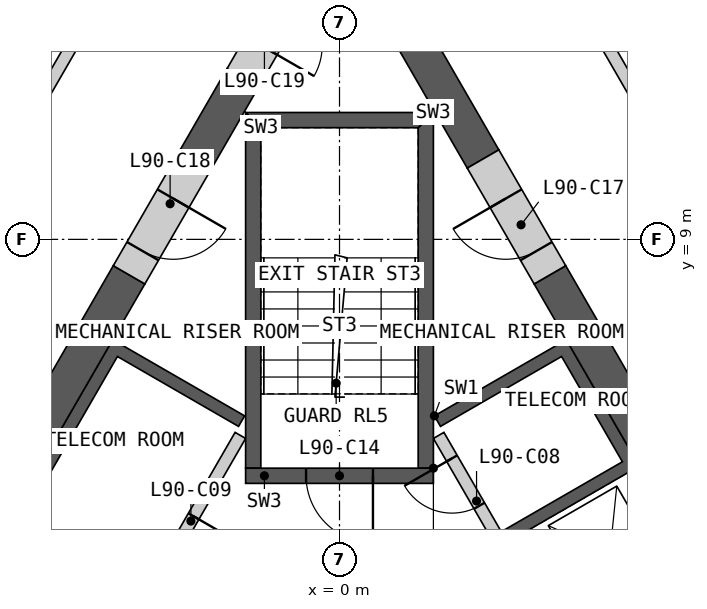
"""IFC4 building model, lengths in metres.
Left out: names, types, materials, properties, quantities, classifications, styles, units other than length and angle.
Written with IfcOpenShell. Run it as: python <this file> out.ifc"""

import sys

from ifc_helpers import new_model, si_unit, direction, frame, frame_2d, origin, place, context, subcontext, project, spatial, polyline, rectangle, outline, extrude, element, fill, save


model = new_model("IFC4")
c1 = context("Model", 3, precision=1e-05, world=origin(), true_north=direction((0.0, 1.0)))
c2 = subcontext(c1, "Body", "Model", "MODEL_VIEW")
j1 = project(units=[si_unit("LENGTHUNIT", "METRE"), si_unit("PLANEANGLEUNIT", "RADIAN")], contexts=[c1])
p1 = place(None, origin())
s1 = spatial("IfcSite", under=j1, at=p1, CompositionType="ELEMENT")
p2 = place(p1, origin())
s2 = spatial("IfcBuilding", under=s1, at=p2, CompositionType="ELEMENT")
p3 = place(p2, frame((0.0, 0.0, 395.0)))
s3 = spatial("IfcBuildingStorey", under=s2, at=p3, CompositionType="ELEMENT", Elevation=395.0)
p4 = place(p3, origin())
e1 = element("IfcWall", 1, at=p4, inside=s3, PredefinedType="SHEAR", context=c2, shape_type="SweptSolid", body=[
    extrude(outline(polyline([(1.561, 6.097), (3.731, 7.35), (8.231, -0.444), (6.061, -1.697), (5.96, -1.524), (7.952, -0.374), (6.952, 1.358), (4.96, 0.208), (4.861, 0.381), (6.852, 1.531), (5.852, 3.263), (3.861, 2.113), (3.76, 2.287), (5.752, 3.437), (4.752, 5.169), (2.76, 4.019), (2.66, 4.192), (4.652, 5.342), (3.652, 7.074), (1.66, 5.924), (1.561, 6.097)])), origin(), (0.0, 0.0, 1.0), 3.1),
])
p5 = place(p3, frame((5.817, -1.476, 0.0), z_axis=(0.0, 0.0, 1.0), x_axis=(-0.500002616675, 0.866023893041, 0.0)))
e2 = element("IfcWall", 2, at=p5, inside=s3, PredefinedType="SOLIDWALL", context=c2, shape_type="SweptSolid", body=[
    extrude(rectangle(XDim=8.373, YDim=0.2, at=frame_2d((4.187, 0.0))), origin(), (0.0, 0.0, 1.0), 3.1),
])
p6 = place(p5, frame((0.337, 0.0, 0.0)))
e3 = element("IfcOpeningElement", 3, at=p6, cuts=e2, PredefinedType="OPENING", context=c2, shape_type="SweptSolid", body=[
    extrude(rectangle(XDim=1.1, YDim=2.1, at=frame_2d((0.55, 1.05))), frame((0.0, 0.11, 0.0), z_axis=(0.0, -1.0, 0.0), x_axis=(1.0, 0.0, 0.0)), (0.0, 0.0, 1.0), 0.22),
])
p7 = place(p5, frame((2.537, 0.0, 0.0)))
e4 = element("IfcOpeningElement", 4, at=p7, cuts=e2, PredefinedType="OPENING", context=c2, shape_type="SweptSolid", body=[
    extrude(rectangle(XDim=1.1, YDim=2.1, at=frame_2d((0.55, 1.05))), frame((0.0, 0.11, 0.0), z_axis=(0.0, -1.0, 0.0), x_axis=(1.0, 0.0, 0.0)), (0.0, 0.0, 1.0), 0.22),
])
p8 = place(p5, frame((4.737, 0.0, 0.0)))
e5 = element("IfcOpeningElement", 5, at=p8, cuts=e2, PredefinedType="OPENING", context=c2, shape_type="SweptSolid", body=[
    extrude(rectangle(XDim=1.1, YDim=2.1, at=frame_2d((0.55, 1.05))), frame((0.0, 0.11, 0.0), z_axis=(0.0, -1.0, 0.0), x_axis=(1.0, 0.0, 0.0)), (0.0, 0.0, 1.0), 0.22),
])
p9 = place(p5, frame((7.037, 0.0, 0.0)))
e6 = element("IfcOpeningElement", 6, at=p9, cuts=e2, PredefinedType="OPENING", context=c2, shape_type="SweptSolid", body=[
    extrude(rectangle(XDim=0.9, YDim=2.1, at=frame_2d((0.45, 1.05))), frame((0.0, 0.11, 0.0), z_axis=(0.0, -1.0, 0.0), x_axis=(1.0, 0.0, 0.0)), (0.0, 0.0, 1.0), 0.22),
])
p10 = place(p3, origin())
e7 = element("IfcWall", 7, at=p10, inside=s3, PredefinedType="SHEAR", context=c2, shape_type="SweptSolid", body=[
    extrude(outline(polyline([(-4.96, 0.208), (-7.131, 1.461), (-3.731, 7.35), (-1.561, 6.097), (-1.66, 5.924), (-3.652, 7.074), (-5.752, 3.437), (-3.76, 2.287), (-3.861, 2.113), (-5.852, 3.263), (-6.852, 1.531), (-4.861, 0.381), (-4.96, 0.208)])), origin(), (0.0, 0.0, 1.0), 3.1),
])
p11 = place(p3, frame((-1.631, 5.776, 0.0), z_axis=(0.0, 0.0, 1.0), x_axis=(-0.499992876559, -0.866029516466, 0.0)))
e8 = element("IfcWall", 8, at=p11, inside=s3, PredefinedType="SOLIDWALL", context=c2, shape_type="SweptSolid", body=[
    extrude(rectangle(XDim=6.486, YDim=0.2, at=frame_2d((3.243, 0.0))), origin(), (0.0, 0.0, 1.0), 3.1),
])
p12 = place(p11, frame((1.537, 0.0, 0.0)))
e9 = element("IfcOpeningElement", 9, at=p12, cuts=e8, PredefinedType="OPENING", context=c2, shape_type="SweptSolid", body=[
    extrude(rectangle(XDim=0.9, YDim=2.1, at=frame_2d((0.45, 1.05))), frame((0.0, 0.11, 0.0), z_axis=(0.0, -1.0, 0.0), x_axis=(1.0, 0.0, 0.0)), (0.0, 0.0, 1.0), 0.22),
])
p13 = place(p11, frame((4.837, 0.0, 0.0)))
e10 = element("IfcOpeningElement", 10, at=p13, cuts=e8, PredefinedType="OPENING", context=c2, shape_type="SweptSolid", body=[
    extrude(rectangle(XDim=0.9, YDim=2.1, at=frame_2d((0.45, 1.05))), frame((0.0, 0.11, 0.0), z_axis=(0.0, -1.0, 0.0), x_axis=(1.0, 0.0, 0.0)), (0.0, 0.0, 1.0), 0.22),
])
p14 = place(p3, origin())
e11 = element("IfcWall", 11, at=p14, inside=s3, PredefinedType="SHEAR", context=c2, shape_type="SweptSolid", body=[
    extrude(outline(polyline([(1.544, 5.237), (1.544, 11.087), (1.294, 10.837), (1.294, 5.237), (1.544, 5.237)])), origin(), (0.0, 0.0, 1.0), 3.1),
])
p15 = place(p3, origin())
e12 = element("IfcWall", 12, at=p15, inside=s3, PredefinedType="SHEAR", context=c2, shape_type="SweptSolid", body=[
    extrude(outline(polyline([(1.544, 11.087), (-1.544, 11.087), (-1.294, 10.837), (1.294, 10.837), (1.544, 11.087)])), origin(), (0.0, 0.0, 1.0), 3.1),
])
p16 = place(p3, origin())
e13 = element("IfcWall", 13, at=p16, inside=s3, PredefinedType="SHEAR", context=c2, shape_type="SweptSolid", body=[
    extrude(outline(polyline([(-1.294, 10.837), (-1.544, 11.087), (-1.544, 5.237), (-1.294, 5.237), (-1.294, 10.837)])), origin(), (0.0, 0.0, 1.0), 3.1),
])
p17 = place(p3, frame((1.544, 5.112, 0.0), z_axis=(0.0, 0.0, 1.0), x_axis=(-1.0, 0.0, 0.0)))
e14 = element("IfcWall", 14, at=p17, inside=s3, PredefinedType="SHEAR", context=c2, shape_type="SweptSolid", body=[
    extrude(rectangle(XDim=3.088, YDim=0.25, at=frame_2d((1.544, 0.0))), origin(), (0.0, 0.0, 1.0), 3.1),
])
p18 = place(p17, frame((0.994, 0.0, 0.0)))
e15 = element("IfcOpeningElement", 15, at=p18, cuts=e14, PredefinedType="OPENING", context=c2, shape_type="SweptSolid", body=[
    extrude(rectangle(XDim=1.1, YDim=2.1, at=frame_2d((0.55, 1.05))), frame((0.0, 0.135, 0.0), z_axis=(0.0, -1.0, 0.0), x_axis=(1.0, 0.0, 0.0)), (0.0, 0.0, 1.0), 0.27),
])
p19 = place(p3, frame((8.686, -0.634, 0.0), z_axis=(0.0, 0.0, 1.0), x_axis=(-0.50001836461, 0.866014800712, 0.0)))
e16 = element("IfcWall", 16, at=p19, inside=s3, PredefinedType="SHEAR", context=c2, shape_type="SweptSolid", body=[
    extrude(rectangle(XDim=10.451, YDim=0.6, at=frame_2d((5.225, 0.0))), origin(), (0.0, 0.0, 1.0), 3.1),
])
p20 = place(p3, frame((2.361, 10.322, 0.0), z_axis=(0.0, 0.0, 1.0), x_axis=(-0.500000735859, 0.866024978935, 0.0)))
e17 = element("IfcWall", 17, at=p20, inside=s3, PredefinedType="SHEAR", context=c2, shape_type="SweptSolid", body=[
    extrude(rectangle(XDim=4.202, YDim=0.6, at=frame_2d((2.101, 0.0))), origin(), (0.0, 0.0, 1.0), 3.1),
])
p21 = place(p3, frame((-3.461, 8.417, 0.0), z_axis=(0.0, 0.0, 1.0), x_axis=(-0.50000391502, -0.866023143435, 0.0)))
e18 = element("IfcWall", 18, at=p21, inside=s3, PredefinedType="SHEAR", context=c2, shape_type="SweptSolid", body=[
    extrude(rectangle(XDim=7.759, YDim=0.6, at=frame_2d((3.879, 0.0))), origin(), (0.0, 0.0, 1.0), 3.1),
])
p22 = place(p3, frame((-1.59, 11.658, 0.0), z_axis=(0.0, 0.0, 1.0), x_axis=(-0.500037594623, -0.866003697431, 0.0)))
e19 = element("IfcWall", 19, at=p22, inside=s3, PredefinedType="SHEAR", context=c2, shape_type="SweptSolid", body=[
    extrude(rectangle(XDim=1.542, YDim=0.6, at=frame_2d((0.771, 0.0))), origin(), (0.0, 0.0, 1.0), 3.1),
])
p23 = place(p3, frame((3.461, 8.417, 0.0), z_axis=(0.0, 0.0, 1.0), x_axis=(-0.499946605688, 0.86605622881, 0.0)))
e20 = element("IfcWall", 20, at=p23, inside=s3, PredefinedType="SHEAR", context=c2, shape_type="SweptSolid", body=[
    extrude(rectangle(XDim=2.2, YDim=0.6, at=frame_2d((1.1, 0.0))), origin(), (0.0, 0.0, 1.0), 3.1),
])
p24 = place(p23, frame((0.45, 0.0, 0.0)))
e21 = element("IfcOpeningElement", 21, at=p24, cuts=e20, PredefinedType="OPENING", context=c2, shape_type="SweptSolid", body=[
    extrude(rectangle(XDim=1.0, YDim=2.1, at=frame_2d((0.5, 1.05))), frame((0.0, 0.31, 0.0), z_axis=(0.0, -1.0, 0.0), x_axis=(1.0, 0.0, 0.0)), (0.0, 0.0, 1.0), 0.62),
])
p25 = place(p3, frame((-2.361, 10.322, 0.0), z_axis=(0.0, 0.0, 1.0), x_axis=(-0.499946605688, -0.86605622881, 0.0)))
e22 = element("IfcWall", 22, at=p25, inside=s3, PredefinedType="SHEAR", context=c2, shape_type="SweptSolid", body=[
    extrude(rectangle(XDim=2.2, YDim=0.6, at=frame_2d((1.1, 0.0))), origin(), (0.0, 0.0, 1.0), 3.1),
])
p26 = place(p25, frame((0.75, 0.0, 0.0)))
e23 = element("IfcOpeningElement", 23, at=p26, cuts=e22, PredefinedType="OPENING", context=c2, shape_type="SweptSolid", body=[
    extrude(rectangle(XDim=1.0, YDim=2.1, at=frame_2d((0.5, 1.05))), frame((0.0, 0.31, 0.0), z_axis=(0.0, -1.0, 0.0), x_axis=(1.0, 0.0, 0.0)), (0.0, 0.0, 1.0), 0.62),
])
p27 = place(p3, frame((-0.26, 13.961, 0.0), z_axis=(0.0, 0.0, 1.0), x_axis=(-0.49997936161, -0.866037319036, 0.0)))
e24 = element("IfcWall", 24, at=p27, inside=s3, PredefinedType="SHEAR", context=c2, shape_type="SweptSolid", body=[
    extrude(rectangle(XDim=2.66, YDim=0.6, at=frame_2d((1.33, 0.0))), origin(), (0.0, 0.0, 1.0), 3.1),
])
p28 = place(p27, frame((1.05, 0.0, 0.0)))
e25 = element("IfcOpeningElement", 25, at=p28, cuts=e24, PredefinedType="OPENING", context=c2, shape_type="SweptSolid", body=[
    extrude(rectangle(XDim=1.0, YDim=2.1, at=frame_2d((0.5, 1.05))), frame((0.0, 0.31, 0.0), z_axis=(0.0, -1.0, 0.0), x_axis=(1.0, 0.0, 0.0)), (0.0, 0.0, 1.0), 0.62),
])
p29 = place(p3, frame((4.403, 12.185, 0.0), z_axis=(0.0, 0.0, 1.0), x_axis=(0.499992155518, -0.866029932751, 0.0)))
e26 = element("IfcWall", 26, at=p29, inside=s3, PredefinedType="PARTITIONING", context=c2, shape_type="SweptSolid", body=[
    extrude(rectangle(XDim=8.123, YDim=0.2, at=frame_2d((4.062, 0.0))), origin(), (0.0, 0.0, 1.0), 3.1),
])
p30 = place(p29, frame((3.762, 0.0, 0.0)))
e27 = element("IfcOpeningElement", 27, at=p30, cuts=e26, PredefinedType="OPENING", context=c2, shape_type="SweptSolid", body=[
    extrude(rectangle(XDim=1.0, YDim=2.1, at=frame_2d((0.5, 1.05))), frame((0.0, 0.11, 0.0), z_axis=(0.0, -1.0, 0.0), x_axis=(1.0, 0.0, 0.0)), (0.0, 0.0, 1.0), 0.22),
])
p31 = place(p3, frame((-8.465, 5.15, 0.0), z_axis=(0.0, 0.0, 1.0), x_axis=(0.499992155518, 0.866029932751, 0.0)))
e28 = element("IfcWall", 28, at=p31, inside=s3, PredefinedType="PARTITIONING", context=c2, shape_type="SweptSolid", body=[
    extrude(rectangle(XDim=8.123, YDim=0.2, at=frame_2d((4.062, 0.0))), origin(), (0.0, 0.0, 1.0), 3.1),
])
p32 = place(p31, frame((1.956, 0.0, 0.0)))
e29 = element("IfcOpeningElement", 29, at=p32, cuts=e28, PredefinedType="OPENING", context=c2, shape_type="SweptSolid", body=[
    extrude(rectangle(XDim=1.0, YDim=2.1, at=frame_2d((0.5, 1.05))), frame((0.0, 0.11, 0.0), z_axis=(0.0, -1.0, 0.0), x_axis=(1.0, 0.0, 0.0)), (0.0, 0.0, 1.0), 0.22),
])
p33 = place(p9, origin())
e30 = element("IfcDoor", 30, at=p33, inside=s3, OperationType="SINGLE_SWING_RIGHT", PredefinedType="DOOR", context=c2, shape_type="SweptSolid", body=[
    extrude(rectangle(XDim=0.9, YDim=2.1, at=frame_2d((0.45, 1.05))), frame((0.0, 0.025, 0.0), z_axis=(0.0, -1.0, 0.0), x_axis=(1.0, 0.0, 0.0)), (0.0, 0.0, 1.0), 0.05),
])
fill(e6, e30)
p34 = place(p12, origin())
e31 = element("IfcDoor", 31, at=p34, inside=s3, OperationType="SINGLE_SWING_LEFT", PredefinedType="DOOR", context=c2, shape_type="SweptSolid", body=[
    extrude(rectangle(XDim=0.9, YDim=2.1, at=frame_2d((0.45, 1.05))), frame((0.0, 0.025, 0.0), z_axis=(0.0, -1.0, 0.0), x_axis=(1.0, 0.0, 0.0)), (0.0, 0.0, 1.0), 0.05),
])
fill(e9, e31)
p35 = place(p18, origin())
e32 = element("IfcDoor", 32, at=p35, inside=s3, OperationType="SINGLE_SWING_LEFT", PredefinedType="DOOR", context=c2, shape_type="SweptSolid", body=[
    extrude(rectangle(XDim=1.1, YDim=2.1, at=frame_2d((0.55, 1.05))), frame((0.0, 0.025, 0.0), z_axis=(0.0, -1.0, 0.0), x_axis=(1.0, 0.0, 0.0)), (0.0, 0.0, 1.0), 0.05),
])
fill(e15, e32)
p36 = place(p24, origin())
e33 = element("IfcDoor", 33, at=p36, inside=s3, OperationType="SINGLE_SWING_RIGHT", PredefinedType="DOOR", context=c2, shape_type="SweptSolid", body=[
    extrude(rectangle(XDim=1.0, YDim=2.1, at=frame_2d((0.5, 1.05))), frame((0.0, 0.055, 0.0), z_axis=(0.0, -1.0, 0.0), x_axis=(1.0, 0.0, 0.0)), (0.0, 0.0, 1.0), 0.05),
])
fill(e21, e33)
p37 = place(p26, origin())
e34 = element("IfcDoor", 34, at=p37, inside=s3, OperationType="SINGLE_SWING_LEFT", PredefinedType="DOOR", context=c2, shape_type="SweptSolid", body=[
    extrude(rectangle(XDim=1.0, YDim=2.1, at=frame_2d((0.5, 1.05))), frame((0.0, 0.055, 0.0), z_axis=(0.0, -1.0, 0.0), x_axis=(1.0, 0.0, 0.0)), (0.0, 0.0, 1.0), 0.05),
])
fill(e23, e34)
save(model, sys.argv[1])
